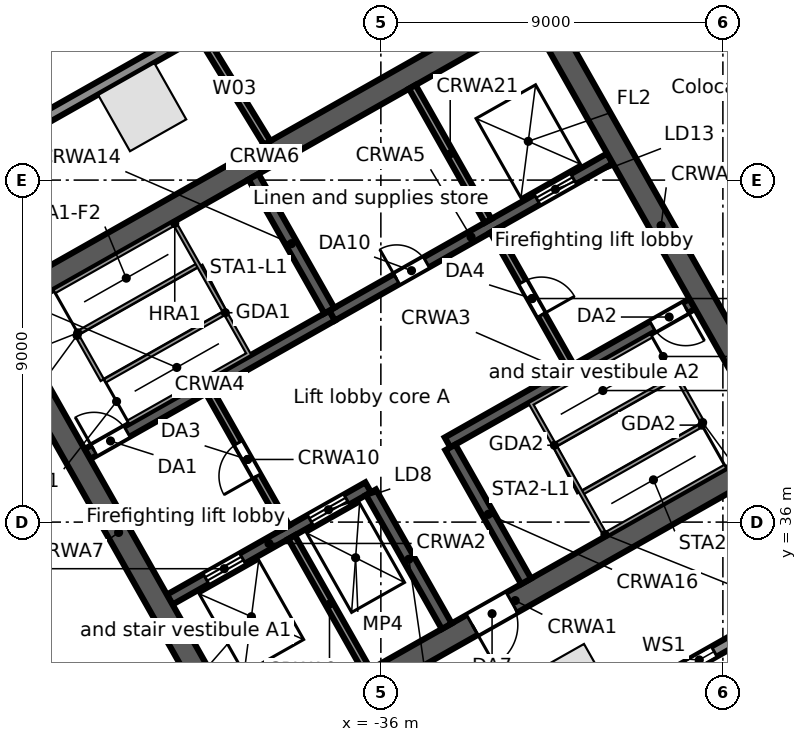
"""IFC4 building model, lengths in metres.
Left out: names, types, materials, properties, quantities, classifications, styles, units other than length and angle.
Written with IfcOpenShell. Run it as: python <this file> out.ifc"""

import sys

from ifc_helpers import new_model, si_unit, direction, frame, frame_2d, origin, origin_2d, place, context, subcontext, project, spatial, rectangle, extrude, element, fill, save


model = new_model("IFC4")
c1 = context("Model", 3, precision=1e-05, world=origin(), true_north=direction((0.0, 1.0)))
c2 = subcontext(c1, "Body", "Model", "MODEL_VIEW")
j1 = project(units=[si_unit("LENGTHUNIT", "METRE"), si_unit("PLANEANGLEUNIT", "RADIAN")], contexts=[c1])
p1 = place(None, origin())
s1 = spatial("IfcSite", under=j1, at=p1, CompositionType="ELEMENT")
p2 = place(p1, origin())
s2 = spatial("IfcBuilding", under=s1, at=p2, CompositionType="ELEMENT")
p3 = place(p2, frame((0.0, 0.0, 31.5)))
s3 = spatial("IfcBuildingStorey", under=s2, at=p3, CompositionType="ELEMENT", Elevation=31.5)
for number, where, z_axis, x_axis in (
    (1, (-42.28, 46.919, 0.0), (0.0, 0.0, 1.0), (-0.87, -0.492, 0.0)),
    (2, (-30.976, 31.635, 0.0), (0.0, 0.0, 1.0), (0.87, 0.492, 0.0)),
):
    element("IfcColumn", number, at=place(p3, frame(where, z_axis=z_axis, x_axis=x_axis)), inside=s3, PredefinedType="COLUMN", context=c2, shape_type="SweptSolid", body=[
        extrude(rectangle(XDim=1.7, YDim=1.7, at=origin_2d()), origin(), (0.0, 0.0, 1.0), 5.0),
    ])
p4 = place(p3, frame((-58.745, 38.764, 0.0), z_axis=(0.0, 0.0, 1.0), x_axis=(0.870355811726, 0.492423355453, 0.0)))
e3 = element("IfcWall", 3, at=p4, inside=s3, PredefinedType="STANDARD", context=c2, shape_type="SweptSolid", body=[
    extrude(rectangle(XDim=64.025, YDim=0.3, at=frame_2d((32.013, 0.0))), origin(), (0.0, 0.0, 1.0), 4.68),
])
p5 = place(p4, frame((60.122, 0.0, 0.6)))
e4 = element("IfcOpeningElement", 4, at=p5, cuts=e3, PredefinedType="OPENING", context=c2, shape_type="SweptSolid", body=[
    extrude(rectangle(XDim=0.9, YDim=3.2, at=frame_2d((0.45, 1.6))), frame((0.0, 0.16, 0.0), z_axis=(0.0, -1.0, 0.0), x_axis=(1.0, 0.0, 0.0)), (0.0, 0.0, 1.0), 0.32),
])
p6 = place(p4, frame((50.992, 0.0, 0.6)))
e5 = element("IfcOpeningElement", 5, at=p6, cuts=e3, PredefinedType="OPENING", context=c2, shape_type="SweptSolid", body=[
    extrude(rectangle(XDim=0.9, YDim=3.2, at=frame_2d((0.45, 1.6))), frame((0.0, 0.16, 0.0), z_axis=(0.0, -1.0, 0.0), x_axis=(1.0, 0.0, 0.0)), (0.0, 0.0, 1.0), 0.32),
])
p7 = place(p4, frame((41.862, 0.0, 0.6)))
e6 = element("IfcOpeningElement", 6, at=p7, cuts=e3, PredefinedType="OPENING", context=c2, shape_type="SweptSolid", body=[
    extrude(rectangle(XDim=0.9, YDim=3.2, at=frame_2d((0.45, 1.6))), frame((0.0, 0.16, 0.0), z_axis=(0.0, -1.0, 0.0), x_axis=(1.0, 0.0, 0.0)), (0.0, 0.0, 1.0), 0.32),
])
p8 = place(p4, frame((32.732, 0.0, 0.6)))
e7 = element("IfcOpeningElement", 7, at=p8, cuts=e3, PredefinedType="OPENING", context=c2, shape_type="SweptSolid", body=[
    extrude(rectangle(XDim=0.9, YDim=3.2, at=frame_2d((0.45, 1.6))), frame((0.0, 0.16, 0.0), z_axis=(0.0, -1.0, 0.0), x_axis=(1.0, 0.0, 0.0)), (0.0, 0.0, 1.0), 0.32),
])
p9 = place(p4, frame((23.602, 0.0, 0.6)))
e8 = element("IfcOpeningElement", 8, at=p9, cuts=e3, PredefinedType="OPENING", context=c2, shape_type="SweptSolid", body=[
    extrude(rectangle(XDim=0.9, YDim=3.2, at=frame_2d((0.45, 1.6))), frame((0.0, 0.16, 0.0), z_axis=(0.0, -1.0, 0.0), x_axis=(1.0, 0.0, 0.0)), (0.0, 0.0, 1.0), 0.32),
])
p10 = place(p4, frame((14.472, 0.0, 0.6)))
e9 = element("IfcOpeningElement", 9, at=p10, cuts=e3, PredefinedType="OPENING", context=c2, shape_type="SweptSolid", body=[
    extrude(rectangle(XDim=0.9, YDim=3.2, at=frame_2d((0.45, 1.6))), frame((0.0, 0.16, 0.0), z_axis=(0.0, -1.0, 0.0), x_axis=(1.0, 0.0, 0.0)), (0.0, 0.0, 1.0), 0.32),
])
p11 = place(p4, frame((5.342, 0.0, 0.6)))
e10 = element("IfcOpeningElement", 10, at=p11, cuts=e3, PredefinedType="OPENING", context=c2, shape_type="SweptSolid", body=[
    extrude(rectangle(XDim=0.9, YDim=3.2, at=frame_2d((0.45, 1.6))), frame((0.0, 0.16, 0.0), z_axis=(0.0, -1.0, 0.0), x_axis=(1.0, 0.0, 0.0)), (0.0, 0.0, 1.0), 0.32),
])
p12 = place(p3, frame((-44.109, 26.504, 0.0), z_axis=(0.0, 0.0, 1.0), x_axis=(-0.857169502585, 0.515034410344, 0.0)))
e11 = element("IfcWall", 11, at=p12, inside=s3, PredefinedType="STANDARD", context=c2, shape_type="SweptSolid", body=[
    extrude(rectangle(XDim=17.127, YDim=0.3, at=frame_2d((8.563, 0.0))), origin(), (0.0, 0.0, 1.0), 4.68),
])
p13 = place(p12, frame((13.403, 0.0, 0.6)))
e12 = element("IfcOpeningElement", 12, at=p13, cuts=e11, PredefinedType="OPENING", context=c2, shape_type="SweptSolid", body=[
    extrude(rectangle(XDim=0.9, YDim=3.2, at=frame_2d((0.45, 1.6))), frame((0.0, 0.16, 0.0), z_axis=(0.0, -1.0, 0.0), x_axis=(1.0, 0.0, 0.0)), (0.0, 0.0, 1.0), 0.32),
])
p14 = place(p12, frame((4.903, 0.0, 0.6)))
e13 = element("IfcOpeningElement", 13, at=p14, cuts=e11, PredefinedType="OPENING", context=c2, shape_type="SweptSolid", body=[
    extrude(rectangle(XDim=0.9, YDim=3.2, at=frame_2d((0.45, 1.6))), frame((0.0, 0.16, 0.0), z_axis=(0.0, -1.0, 0.0), x_axis=(1.0, 0.0, 0.0)), (0.0, 0.0, 1.0), 0.32),
])
p15 = place(p3, frame((-0.055, 47.969, 0.0), z_axis=(0.0, 0.0, 1.0), x_axis=(-0.870355730478, -0.492423499058, 0.0)))
e14 = element("IfcWall", 14, at=p15, inside=s3, PredefinedType="STANDARD", context=c2, shape_type="SweptSolid", body=[
    extrude(rectangle(XDim=43.75, YDim=0.3, at=frame_2d((21.875, 0.0))), origin(), (0.0, 0.0, 1.0), 4.68),
])
p16 = place(p15, frame((39.977, 0.0, 0.6)))
e15 = element("IfcOpeningElement", 15, at=p16, cuts=e14, PredefinedType="OPENING", context=c2, shape_type="SweptSolid", body=[
    extrude(rectangle(XDim=0.9, YDim=3.2, at=frame_2d((0.45, 1.6))), frame((0.0, 0.16, 0.0), z_axis=(0.0, -1.0, 0.0), x_axis=(1.0, 0.0, 0.0)), (0.0, 0.0, 1.0), 0.32),
])
p17 = place(p15, frame((31.222, 0.0, 0.6)))
e16 = element("IfcOpeningElement", 16, at=p17, cuts=e14, PredefinedType="OPENING", context=c2, shape_type="SweptSolid", body=[
    extrude(rectangle(XDim=0.9, YDim=3.2, at=frame_2d((0.45, 1.6))), frame((0.0, 0.16, 0.0), z_axis=(0.0, -1.0, 0.0), x_axis=(1.0, 0.0, 0.0)), (0.0, 0.0, 1.0), 0.32),
])
p18 = place(p15, frame((22.468, 0.0, 0.6)))
e17 = element("IfcOpeningElement", 17, at=p18, cuts=e14, PredefinedType="OPENING", context=c2, shape_type="SweptSolid", body=[
    extrude(rectangle(XDim=0.9, YDim=3.2, at=frame_2d((0.45, 1.6))), frame((0.0, 0.16, 0.0), z_axis=(0.0, -1.0, 0.0), x_axis=(1.0, 0.0, 0.0)), (0.0, 0.0, 1.0), 0.32),
])
p19 = place(p15, frame((13.713, 0.0, 0.6)))
e18 = element("IfcOpeningElement", 18, at=p19, cuts=e14, PredefinedType="OPENING", context=c2, shape_type="SweptSolid", body=[
    extrude(rectangle(XDim=0.9, YDim=3.2, at=frame_2d((0.45, 1.6))), frame((0.0, 0.16, 0.0), z_axis=(0.0, -1.0, 0.0), x_axis=(1.0, 0.0, 0.0)), (0.0, 0.0, 1.0), 0.32),
])
p20 = place(p15, frame((4.959, 0.0, 0.6)))
e19 = element("IfcOpeningElement", 19, at=p20, cuts=e14, PredefinedType="OPENING", context=c2, shape_type="SweptSolid", body=[
    extrude(rectangle(XDim=0.9, YDim=3.2, at=frame_2d((0.45, 1.6))), frame((0.0, 0.16, 0.0), z_axis=(0.0, -1.0, 0.0), x_axis=(1.0, 0.0, 0.0)), (0.0, 0.0, 1.0), 0.32),
])
p21 = place(p3, frame((-39.862, 29.749, 0.0), z_axis=(0.0, 0.0, 1.0), x_axis=(0.870350116061, 0.492433422375, 0.0)))
e20 = element("IfcWall", 20, at=p21, inside=s3, PredefinedType="SOLIDWALL", context=c2, shape_type="SweptSolid", body=[
    extrude(rectangle(XDim=17.0, YDim=0.6, at=frame_2d((8.5, 0.0))), origin(), (0.0, 0.0, 1.0), 4.68),
])
p22 = place(p21, frame((7.2, 0.0, 0.0)))
e21 = element("IfcOpeningElement", 21, at=p22, cuts=e20, PredefinedType="OPENING", context=c2, shape_type="SweptSolid", body=[
    extrude(rectangle(XDim=1.2, YDim=2.1, at=frame_2d((0.6, 1.05))), frame((0.0, 0.31, 0.0), z_axis=(0.0, -1.0, 0.0), x_axis=(1.0, 0.0, 0.0)), (0.0, 0.0, 1.0), 0.62),
])
p23 = place(p3, frame((-41.556, 33.961, 0.0), z_axis=(0.0, 0.0, 1.0), x_axis=(0.870343731308, 0.492444706919, 0.0)))
e22 = element("IfcWall", 22, at=p23, inside=s3, PredefinedType="SOLIDWALL", context=c2, shape_type="SweptSolid", body=[
    extrude(rectangle(XDim=6.0, YDim=0.3, at=frame_2d((3.0, 0.0))), origin(), (0.0, 0.0, 1.0), 4.68),
])
p24 = place(p23, frame((1.1, 0.0, 0.0)))
e23 = element("IfcOpeningElement", 23, at=p24, cuts=e22, PredefinedType="OPENING", context=c2, shape_type="SweptSolid", body=[
    extrude(rectangle(XDim=1.1, YDim=2.1, at=frame_2d((0.55, 1.05))), frame((0.0, 0.16, 0.0), z_axis=(0.0, -1.0, 0.0), x_axis=(1.0, 0.0, 0.0)), (0.0, 0.0, 1.0), 0.32),
])
p25 = place(p23, frame((4.25, 0.0, 0.0)))
e24 = element("IfcOpeningElement", 24, at=p25, cuts=e22, PredefinedType="OPENING", context=c2, shape_type="SweptSolid", body=[
    extrude(rectangle(XDim=1.1, YDim=2.1, at=frame_2d((0.55, 1.05))), frame((0.0, 0.16, 0.0), z_axis=(0.0, -1.0, 0.0), x_axis=(1.0, 0.0, 0.0)), (0.0, 0.0, 1.0), 0.32),
])
p26 = place(p3, frame((-34.245, 38.097, 0.0), z_axis=(0.0, 0.0, 1.0), x_axis=(0.870364910201, 0.492407273597, 0.0)))
e25 = element("IfcWall", 25, at=p26, inside=s3, PredefinedType="SOLIDWALL", context=c2, shape_type="SweptSolid", body=[
    extrude(rectangle(XDim=7.4, YDim=0.3, at=frame_2d((3.7, 0.0))), origin(), (0.0, 0.0, 1.0), 4.68),
])
p27 = place(p26, frame((6.2, 0.0, 0.0)))
e26 = element("IfcOpeningElement", 26, at=p27, cuts=e25, PredefinedType="OPENING", context=c2, shape_type="SweptSolid", body=[
    extrude(rectangle(XDim=1.0, YDim=2.1, at=frame_2d((0.5, 1.05))), frame((0.0, 0.16, 0.0), z_axis=(0.0, -1.0, 0.0), x_axis=(1.0, 0.0, 0.0)), (0.0, 0.0, 1.0), 0.32),
])
p28 = place(p3, frame((-43.723, 37.791, 0.0), z_axis=(0.0, 0.0, 1.0), x_axis=(0.87035077051, 0.49243226567, 0.0)))
e27 = element("IfcWall", 27, at=p28, inside=s3, PredefinedType="SOLIDWALL", context=c2, shape_type="SweptSolid", body=[
    extrude(rectangle(XDim=7.4, YDim=0.3, at=frame_2d((3.7, 0.0))), origin(), (0.0, 0.0, 1.0), 4.68),
])
p29 = place(p28, frame((0.2, 0.0, 0.0)))
e28 = element("IfcOpeningElement", 28, at=p29, cuts=e27, PredefinedType="OPENING", context=c2, shape_type="SweptSolid", body=[
    extrude(rectangle(XDim=1.0, YDim=2.1, at=frame_2d((0.5, 1.05))), frame((0.0, 0.16, 0.0), z_axis=(0.0, -1.0, 0.0), x_axis=(1.0, 0.0, 0.0)), (0.0, 0.0, 1.0), 0.32),
])
p30 = place(p3, frame((-37.282, 41.435, 0.0), z_axis=(0.0, 0.0, 1.0), x_axis=(0.870356516133, 0.492422110414, 0.0)))
e29 = element("IfcWall", 29, at=p30, inside=s3, PredefinedType="SOLIDWALL", context=c2, shape_type="SweptSolid", body=[
    extrude(rectangle(XDim=8.4, YDim=0.3, at=frame_2d((4.2, 0.0))), origin(), (0.0, 0.0, 1.0), 4.68),
])
p31 = place(p30, frame((6.2, 0.0, 0.0)))
e30 = element("IfcOpeningElement", 30, at=p31, cuts=e29, PredefinedType="OPENING", context=c2, shape_type="SweptSolid", body=[
    extrude(rectangle(XDim=1.1, YDim=2.1, at=frame_2d((0.55, 1.05))), frame((0.0, 0.16, 0.0), z_axis=(0.0, -1.0, 0.0), x_axis=(1.0, 0.0, 0.0)), (0.0, 0.0, 1.0), 0.32),
])
p32 = place(p30, frame((1.95, 0.0, 0.0)))
e31 = element("IfcOpeningElement", 31, at=p32, cuts=e29, PredefinedType="OPENING", context=c2, shape_type="SweptSolid", body=[
    extrude(rectangle(XDim=0.9, YDim=2.1, at=frame_2d((0.45, 1.05))), frame((0.0, 0.16, 0.0), z_axis=(0.0, -1.0, 0.0), x_axis=(1.0, 0.0, 0.0)), (0.0, 0.0, 1.0), 0.32),
])
p33 = place(p3, frame((-46.461, 41.412, 0.0), z_axis=(0.0, 0.0, 1.0), x_axis=(0.870350116061, 0.492433422375, 0.0)))
e32 = element("IfcWall", 32, at=p33, inside=s3, PredefinedType="SOLIDWALL", context=c2, shape_type="SweptSolid", body=[
    extrude(rectangle(XDim=17.0, YDim=0.6, at=frame_2d((8.5, 0.0))), origin(), (0.0, 0.0, 1.0), 4.68),
])
p34 = place(p3, frame((-46.052, 41.298, 0.0), z_axis=(0.0, 0.0, 1.0), x_axis=(0.492418598281, -0.870358503186, 0.0)))
e33 = element("IfcWall", 33, at=p34, inside=s3, PredefinedType="SOLIDWALL", context=c2, shape_type="SweptSolid", body=[
    extrude(rectangle(XDim=12.8, YDim=0.6, at=frame_2d((6.4, 0.0))), origin(), (0.0, 0.0, 1.0), 4.68),
])
p35 = place(p3, frame((-38.349, 35.603, 0.0), z_axis=(0.0, 0.0, 1.0), x_axis=(0.49241474071, -0.870360685654, 0.0)))
e34 = element("IfcWall", 34, at=p35, inside=s3, PredefinedType="SOLIDWALL", context=c2, shape_type="SweptSolid", body=[
    extrude(rectangle(XDim=4.05, YDim=0.2, at=frame_2d((2.025, 0.0))), origin(), (0.0, 0.0, 1.0), 4.68),
])
p36 = place(p3, frame((-40.516, 39.433, 0.0), z_axis=(0.0, 0.0, 1.0), x_axis=(0.492453559952, -0.87033872216, 0.0)))
e35 = element("IfcWall", 35, at=p36, inside=s3, PredefinedType="PARTITIONING", context=c2, shape_type="SweptSolid", body=[
    extrude(rectangle(XDim=4.1, YDim=0.2, at=frame_2d((2.05, 0.0))), origin(), (0.0, 0.0, 1.0), 4.68),
])
p37 = place(p36, frame((1.55, 0.0, 0.0)))
e36 = element("IfcOpeningElement", 36, at=p37, cuts=e35, PredefinedType="OPENING", context=c2, shape_type="SweptSolid", body=[
    extrude(rectangle(XDim=1.0, YDim=2.1, at=frame_2d((0.5, 1.05))), frame((0.0, 0.11, 0.0), z_axis=(0.0, -1.0, 0.0), x_axis=(1.0, 0.0, 0.0)), (0.0, 0.0, 1.0), 0.22),
])
p38 = place(p3, frame((-36.26, 36.785, 0.0), z_axis=(0.0, 0.0, 1.0), x_axis=(0.492440575896, -0.870346068648, 0.0)))
e37 = element("IfcWall", 37, at=p38, inside=s3, PredefinedType="SOLIDWALL", context=c2, shape_type="SweptSolid", body=[
    extrude(rectangle(XDim=4.05, YDim=0.3, at=frame_2d((2.025, 0.0))), origin(), (0.0, 0.0, 1.0), 4.68),
])
p39 = place(p3, frame((-39.35, 45.09, 0.0), z_axis=(0.0, 0.0, 1.0), x_axis=(0.49241474071, -0.870360685654, 0.0)))
e38 = element("IfcWall", 38, at=p39, inside=s3, PredefinedType="SOLIDWALL", context=c2, shape_type="SweptSolid", body=[
    extrude(rectangle(XDim=4.05, YDim=0.3, at=frame_2d((2.025, 0.0))), origin(), (0.0, 0.0, 1.0), 4.68),
])
p40 = place(p3, frame((-34.171, 37.967, 0.0), z_axis=(0.0, 0.0, 1.0), x_axis=(0.492394910396, -0.870371904542, 0.0)))
e39 = element("IfcWall", 39, at=p40, inside=s3, PredefinedType="SOLIDWALL", context=c2, shape_type="SweptSolid", body=[
    extrude(rectangle(XDim=4.05, YDim=0.3, at=frame_2d((2.025, 0.0))), origin(), (0.0, 0.0, 1.0), 4.68),
])
p41 = place(p3, frame((-33.031, 43.667, 0.0), z_axis=(0.0, 0.0, 1.0), x_axis=(0.492408451753, -0.87036424366, 0.0)))
e40 = element("IfcWall", 40, at=p41, inside=s3, PredefinedType="PARTITIONING", context=c2, shape_type="SweptSolid", body=[
    extrude(rectangle(XDim=4.1, YDim=0.2, at=frame_2d((2.05, 0.0))), origin(), (0.0, 0.0, 1.0), 4.68),
])
p42 = place(p41, frame((1.55, 0.0, 0.0)))
e41 = element("IfcOpeningElement", 41, at=p42, cuts=e40, PredefinedType="OPENING", context=c2, shape_type="SweptSolid", body=[
    extrude(rectangle(XDim=1.0, YDim=2.1, at=frame_2d((0.5, 1.05))), frame((0.0, 0.11, 0.0), z_axis=(0.0, -1.0, 0.0), x_axis=(1.0, 0.0, 0.0)), (0.0, 0.0, 1.0), 0.22),
])
p43 = place(p3, frame((-35.173, 47.454, 0.0), z_axis=(0.0, 0.0, 1.0), x_axis=(0.492440575896, -0.870346068648, 0.0)))
e42 = element("IfcWall", 42, at=p43, inside=s3, PredefinedType="SOLIDWALL", context=c2, shape_type="SweptSolid", body=[
    extrude(rectangle(XDim=4.05, YDim=0.2, at=frame_2d((2.025, 0.0))), origin(), (0.0, 0.0, 1.0), 4.68),
])
p44 = place(p3, frame((-31.778, 49.374, 0.0), z_axis=(0.0, 0.0, 1.0), x_axis=(0.492433046652, -0.870350328641, 0.0)))
e43 = element("IfcWall", 43, at=p44, inside=s3, PredefinedType="SOLIDWALL", context=c2, shape_type="SweptSolid", body=[
    extrude(rectangle(XDim=12.8, YDim=0.6, at=frame_2d((6.4, 0.0))), origin(), (0.0, 0.0, 1.0), 4.68),
])
p45 = place(p3, frame((-40.713, 48.794, 0.0), z_axis=(0.0, 0.0, 1.0), x_axis=(0.52165366254, -0.853157345604, 0.0)))
e44 = element("IfcWall", 44, at=p45, inside=s3, PredefinedType="PARTITIONING", context=c2, shape_type="SweptSolid", body=[
    extrude(rectangle(XDim=3.297, YDim=0.2, at=frame_2d((1.648, 0.0))), origin(), (0.0, 0.0, 1.0), 3.96),
])
p46 = place(p17, origin())
e45 = element("IfcWindow", 45, at=p46, inside=s3, PartitioningType="SINGLE_PANEL", PredefinedType="WINDOW", context=c2, shape_type="SweptSolid", body=[
    extrude(rectangle(XDim=0.9, YDim=3.2, at=frame_2d((0.45, 1.6))), frame((0.0, 0.03, 0.0), z_axis=(0.0, -1.0, 0.0), x_axis=(1.0, 0.0, 0.0)), (0.0, 0.0, 1.0), 0.06),
])
fill(e16, e45)
p47 = place(p31, origin())
e46 = element("IfcDoor", 46, at=p47, inside=s3, OperationType="DOUBLE_DOOR_SLIDING", PredefinedType="DOOR", context=c2, shape_type="SweptSolid", body=[
    extrude(rectangle(XDim=1.1, YDim=2.1, at=frame_2d((0.55, 1.05))), frame((0.0, 0.025, 0.0), z_axis=(0.0, -1.0, 0.0), x_axis=(1.0, 0.0, 0.0)), (0.0, 0.0, 1.0), 0.05),
])
fill(e30, e46)
p48 = place(p24, origin())
e47 = element("IfcDoor", 47, at=p48, inside=s3, OperationType="DOUBLE_DOOR_SLIDING", PredefinedType="DOOR", context=c2, shape_type="SweptSolid", body=[
    extrude(rectangle(XDim=1.1, YDim=2.1, at=frame_2d((0.55, 1.05))), frame((0.0, 0.025, 0.0), z_axis=(0.0, -1.0, 0.0), x_axis=(1.0, 0.0, 0.0)), (0.0, 0.0, 1.0), 0.05),
])
fill(e23, e47)
p49 = place(p25, origin())
e48 = element("IfcDoor", 48, at=p49, inside=s3, OperationType="DOUBLE_DOOR_SLIDING", PredefinedType="DOOR", context=c2, shape_type="SweptSolid", body=[
    extrude(rectangle(XDim=1.1, YDim=2.1, at=frame_2d((0.55, 1.05))), frame((0.0, 0.025, 0.0), z_axis=(0.0, -1.0, 0.0), x_axis=(1.0, 0.0, 0.0)), (0.0, 0.0, 1.0), 0.05),
])
fill(e24, e48)
p50 = place(p29, origin())
e49 = element("IfcDoor", 49, at=p50, inside=s3, OperationType="SINGLE_SWING_LEFT", PredefinedType="DOOR", context=c2, shape_type="SweptSolid", body=[
    extrude(rectangle(XDim=1.0, YDim=2.1, at=frame_2d((0.5, 1.05))), frame((0.0, 0.025, 0.0), z_axis=(0.0, -1.0, 0.0), x_axis=(1.0, 0.0, 0.0)), (0.0, 0.0, 1.0), 0.05),
])
fill(e28, e49)
p51 = place(p27, frame((1.0, 0.0, 0.0), z_axis=(0.0, 0.0, 1.0), x_axis=(-1.0, 0.0, 0.0)))
e50 = element("IfcDoor", 50, at=p51, inside=s3, OperationType="SINGLE_SWING_LEFT", PredefinedType="DOOR", context=c2, shape_type="SweptSolid", body=[
    extrude(rectangle(XDim=1.0, YDim=2.1, at=frame_2d((0.5, 1.05))), frame((0.0, 0.025, 0.0), z_axis=(0.0, -1.0, 0.0), x_axis=(1.0, 0.0, 0.0)), (0.0, 0.0, 1.0), 0.05),
])
fill(e26, e50)
p52 = place(p37, frame((1.0, 0.0, 0.0), z_axis=(0.0, 0.0, 1.0), x_axis=(-1.0, 0.0, 0.0)))
e51 = element("IfcDoor", 51, at=p52, inside=s3, OperationType="SINGLE_SWING_LEFT", PredefinedType="DOOR", context=c2, shape_type="SweptSolid", body=[
    extrude(rectangle(XDim=1.0, YDim=2.1, at=frame_2d((0.5, 1.05))), frame((0.0, 0.025, 0.0), z_axis=(0.0, -1.0, 0.0), x_axis=(1.0, 0.0, 0.0)), (0.0, 0.0, 1.0), 0.05),
])
fill(e36, e51)
p53 = place(p42, origin())
e52 = element("IfcDoor", 52, at=p53, inside=s3, OperationType="SINGLE_SWING_RIGHT", PredefinedType="DOOR", context=c2, shape_type="SweptSolid", body=[
    extrude(rectangle(XDim=1.0, YDim=2.1, at=frame_2d((0.5, 1.05))), frame((0.0, 0.025, 0.0), z_axis=(0.0, -1.0, 0.0), x_axis=(1.0, 0.0, 0.0)), (0.0, 0.0, 1.0), 0.05),
])
fill(e41, e52)
p54 = place(p22, frame((1.2, 0.0, 0.0), z_axis=(0.0, 0.0, 1.0), x_axis=(-1.0, 0.0, 0.0)))
e53 = element("IfcDoor", 53, at=p54, inside=s3, OperationType="SINGLE_SWING_RIGHT", PredefinedType="DOOR", context=c2, shape_type="SweptSolid", body=[
    extrude(rectangle(XDim=1.2, YDim=2.1, at=frame_2d((0.6, 1.05))), frame((0.0, 0.025, 0.0), z_axis=(0.0, -1.0, 0.0), x_axis=(1.0, 0.0, 0.0)), (0.0, 0.0, 1.0), 0.05),
])
fill(e21, e53)
p55 = place(p32, origin())
e54 = element("IfcDoor", 54, at=p55, inside=s3, OperationType="SINGLE_SWING_LEFT", PredefinedType="DOOR", context=c2, shape_type="SweptSolid", body=[
    extrude(rectangle(XDim=0.9, YDim=2.1, at=frame_2d((0.45, 1.05))), frame((0.0, 0.025, 0.0), z_axis=(0.0, -1.0, 0.0), x_axis=(1.0, 0.0, 0.0)), (0.0, 0.0, 1.0), 0.05),
])
fill(e31, e54)
save(model, sys.argv[1])
